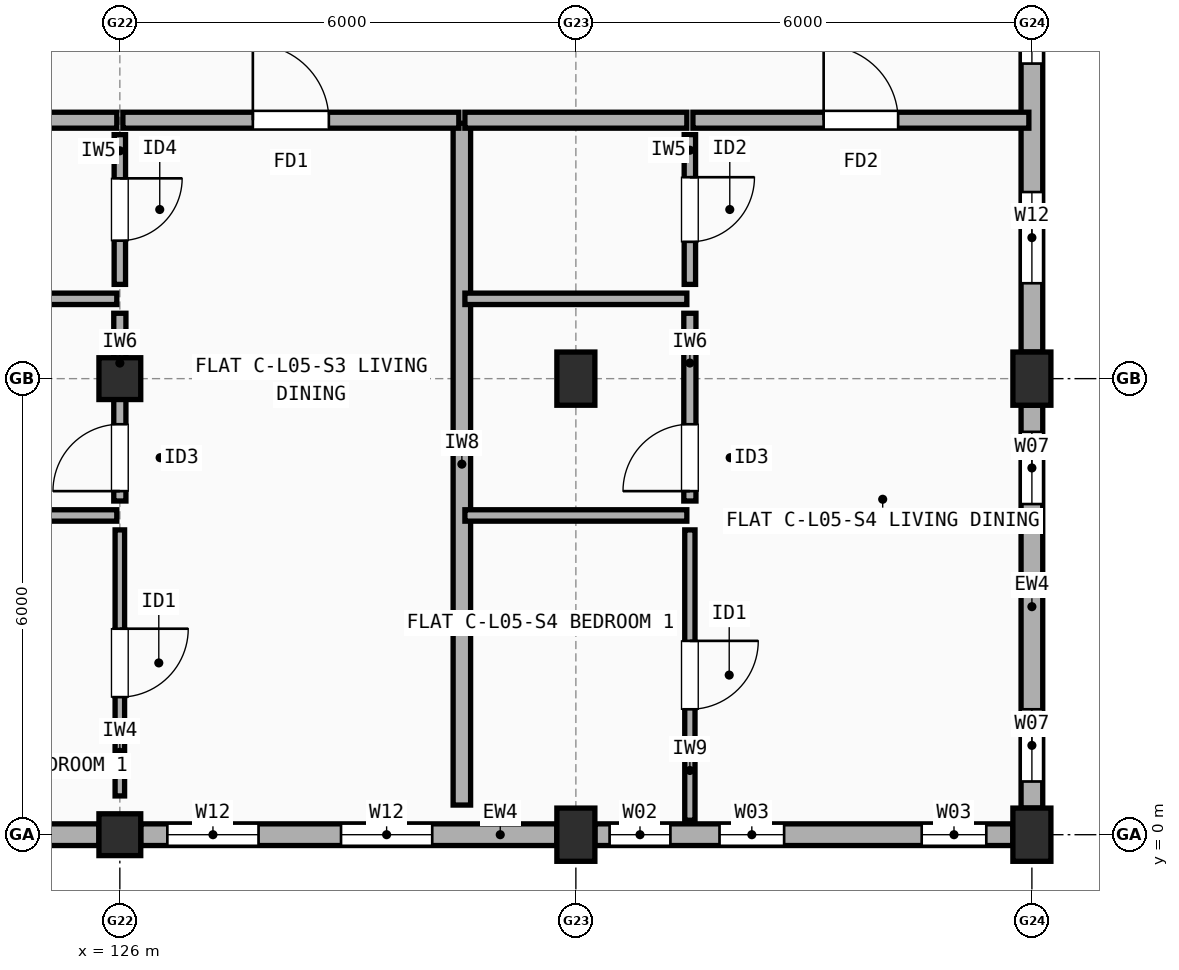
"""IFC4 building model, lengths in metres.
Left out: names, types, materials, properties, quantities, classifications, styles, units other than length and angle.
Written with IfcOpenShell. Run it as: python <this file> out.ifc"""

import sys

from ifc_helpers import new_model, si_unit, direction, frame, frame_2d, origin, origin_2d, place, context, subcontext, project, spatial, rectangle, extrude, element, fill, save


model = new_model("IFC4")
c1 = context("Model", 3, precision=1e-05, world=origin(), true_north=direction((0.0, 1.0)))
c2 = subcontext(c1, "Body", "Model", "MODEL_VIEW")
j1 = project(units=[si_unit("LENGTHUNIT", "METRE"), si_unit("PLANEANGLEUNIT", "RADIAN")], contexts=[c1])
p1 = place(None, origin())
s1 = spatial("IfcSite", under=j1, at=p1, CompositionType="ELEMENT")
p2 = place(p1, origin())
s2 = spatial("IfcBuilding", under=s1, at=p2, CompositionType="ELEMENT")
p3 = place(p2, frame((0.0, 0.0, 17.3)))
s3 = spatial("IfcBuildingStorey", under=s2, at=p3, CompositionType="ELEMENT", Elevation=17.3)
for number, where, z_axis, x_axis in (
    (1, (126.0, 0.0, 0.0), (0.0, 0.0, 1.0), (1.0, 0.0, 0.0)),
    (2, (126.0, 6.0, 0.0), (0.0, 0.0, 1.0), (1.0, 0.0, 0.0)),
):
    element("IfcColumn", number, at=place(p3, frame(where, z_axis=z_axis, x_axis=x_axis)), inside=s3, PredefinedType="COLUMN", context=c2, shape_type="SweptSolid", body=[
        extrude(rectangle(XDim=0.55, YDim=0.55, at=origin_2d()), origin(), (0.0, 0.0, 1.0), 2.965),
    ])
for number, where, z_axis, x_axis in (
    (3, (132.0, 0.0, 0.0), (0.0, 0.0, 1.0), (1.0, 0.0, 0.0)),
    (4, (132.0, 6.0, 0.0), (0.0, 0.0, 1.0), (1.0, 0.0, 0.0)),
    (5, (138.0, 0.0, 0.0), (0.0, 0.0, 1.0), (1.0, 0.0, 0.0)),
    (6, (138.0, 6.0, 0.0), (0.0, 0.0, 1.0), (1.0, 0.0, 0.0)),
):
    element("IfcColumn", number, at=place(p3, frame(where, z_axis=z_axis, x_axis=x_axis)), inside=s3, PredefinedType="COLUMN", context=c2, shape_type="SweptSolid", body=[
        extrude(rectangle(XDim=0.5, YDim=0.7, at=origin_2d()), origin(), (0.0, 0.0, 1.0), 2.965),
    ])
p4 = place(p3, frame((120.275, 0.0, 0.0), z_axis=(0.0, 0.0, 1.0), x_axis=(1.0, 0.0, 0.0)))
e7 = element("IfcWall", 7, at=p4, inside=s3, PredefinedType="STANDARD", context=c2, shape_type="SweptSolid", body=[
    extrude(rectangle(XDim=5.45, YDim=0.285, at=frame_2d((2.725, 0.0))), origin(), (0.0, 0.0, 1.0), 2.447),
])
p5 = place(p4, frame((0.867, 0.0, 0.9)))
e8 = element("IfcOpeningElement", 8, at=p5, cuts=e7, PredefinedType="OPENING", context=c2, shape_type="SweptSolid", body=[
    extrude(rectangle(XDim=0.95, YDim=1.35, at=frame_2d((0.475, 0.675))), frame((0.0, 0.152, 0.0), z_axis=(0.0, -1.0, 0.0), x_axis=(1.0, 0.0, 0.0)), (0.0, 0.0, 1.0), 0.305),
])
p6 = place(p4, frame((3.583, 0.0, 0.9)))
e9 = element("IfcOpeningElement", 9, at=p6, cuts=e7, PredefinedType="OPENING", context=c2, shape_type="SweptSolid", body=[
    extrude(rectangle(XDim=1.05, YDim=1.35, at=frame_2d((0.525, 0.675))), frame((0.0, 0.152, 0.0), z_axis=(0.0, -1.0, 0.0), x_axis=(1.0, 0.0, 0.0)), (0.0, 0.0, 1.0), 0.305),
])
p7 = place(p3, frame((126.275, 0.0, 0.0), z_axis=(0.0, 0.0, 1.0), x_axis=(1.0, 0.0, 0.0)))
e10 = element("IfcWall", 10, at=p7, inside=s3, PredefinedType="STANDARD", context=c2, shape_type="SweptSolid", body=[
    extrude(rectangle(XDim=5.475, YDim=0.285, at=frame_2d((2.738, 0.0))), origin(), (0.0, 0.0, 1.0), 2.447),
])
p8 = place(p7, frame((0.35, 0.0, 0.9)))
e11 = element("IfcOpeningElement", 11, at=p8, cuts=e10, PredefinedType="OPENING", context=c2, shape_type="SweptSolid", body=[
    extrude(rectangle(XDim=1.2, YDim=1.35, at=frame_2d((0.6, 0.675))), frame((0.0, 0.152, 0.0), z_axis=(0.0, -1.0, 0.0), x_axis=(1.0, 0.0, 0.0)), (0.0, 0.0, 1.0), 0.305),
])
p9 = place(p7, frame((2.635, 0.0, 0.9)))
e12 = element("IfcOpeningElement", 12, at=p9, cuts=e10, PredefinedType="OPENING", context=c2, shape_type="SweptSolid", body=[
    extrude(rectangle(XDim=1.2, YDim=1.35, at=frame_2d((0.6, 0.675))), frame((0.0, 0.152, 0.0), z_axis=(0.0, -1.0, 0.0), x_axis=(1.0, 0.0, 0.0)), (0.0, 0.0, 1.0), 0.305),
])
p10 = place(p3, frame((132.25, 0.0, 0.0), z_axis=(0.0, 0.0, 1.0), x_axis=(1.0, 0.0, 0.0)))
e13 = element("IfcWall", 13, at=p10, inside=s3, PredefinedType="STANDARD", context=c2, shape_type="SweptSolid", body=[
    extrude(rectangle(XDim=5.5, YDim=0.285, at=frame_2d((2.75, 0.0))), origin(), (0.0, 0.0, 1.0), 2.447),
])
p11 = place(p10, frame((1.64, 0.0, 0.9)))
e14 = element("IfcOpeningElement", 14, at=p11, cuts=e13, PredefinedType="OPENING", context=c2, shape_type="SweptSolid", body=[
    extrude(rectangle(XDim=0.85, YDim=1.25, at=frame_2d((0.425, 0.625))), frame((0.0, 0.152, 0.0), z_axis=(0.0, -1.0, 0.0), x_axis=(1.0, 0.0, 0.0)), (0.0, 0.0, 1.0), 0.305),
])
p12 = place(p10, frame((4.3, 0.0, 0.9)))
e15 = element("IfcOpeningElement", 15, at=p12, cuts=e13, PredefinedType="OPENING", context=c2, shape_type="SweptSolid", body=[
    extrude(rectangle(XDim=0.85, YDim=1.25, at=frame_2d((0.425, 0.625))), frame((0.0, 0.152, 0.0), z_axis=(0.0, -1.0, 0.0), x_axis=(1.0, 0.0, 0.0)), (0.0, 0.0, 1.0), 0.305),
])
p13 = place(p10, frame((0.194, 0.0, 0.9)))
e16 = element("IfcOpeningElement", 16, at=p13, cuts=e13, PredefinedType="OPENING", context=c2, shape_type="SweptSolid", body=[
    extrude(rectangle(XDim=0.8, YDim=1.2, at=frame_2d((0.4, 0.6))), frame((0.0, 0.152, 0.0), z_axis=(0.0, -1.0, 0.0), x_axis=(1.0, 0.0, 0.0)), (0.0, 0.0, 1.0), 0.305),
])
p14 = place(p3, frame((138.0, 0.35, 0.0), z_axis=(0.0, 0.0, 1.0), x_axis=(0.0, 1.0, 0.0)))
e17 = element("IfcWall", 17, at=p14, inside=s3, PredefinedType="STANDARD", context=c2, shape_type="SweptSolid", body=[
    extrude(rectangle(XDim=5.3, YDim=0.285, at=frame_2d((2.65, 0.0))), origin(), (0.0, 0.0, 1.0), 2.447),
])
p15 = place(p14, frame((0.35, 0.0, 0.9)))
e18 = element("IfcOpeningElement", 18, at=p15, cuts=e17, PredefinedType="OPENING", context=c2, shape_type="SweptSolid", body=[
    extrude(rectangle(XDim=0.95, YDim=1.35, at=frame_2d((0.475, 0.675))), frame((0.0, 0.152, 0.0), z_axis=(0.0, -1.0, 0.0), x_axis=(1.0, 0.0, 0.0)), (0.0, 0.0, 1.0), 0.305),
])
p16 = place(p14, frame((4.0, 0.0, 0.9)))
e19 = element("IfcOpeningElement", 19, at=p16, cuts=e17, PredefinedType="OPENING", context=c2, shape_type="SweptSolid", body=[
    extrude(rectangle(XDim=0.95, YDim=1.35, at=frame_2d((0.475, 0.675))), frame((0.0, 0.152, 0.0), z_axis=(0.0, -1.0, 0.0), x_axis=(1.0, 0.0, 0.0)), (0.0, 0.0, 1.0), 0.305),
])
p17 = place(p3, frame((138.0, 6.35, 0.0), z_axis=(0.0, 0.0, 1.0), x_axis=(0.0, 1.0, 0.0)))
e20 = element("IfcWall", 20, at=p17, inside=s3, PredefinedType="STANDARD", context=c2, shape_type="SweptSolid", body=[
    extrude(rectangle(XDim=5.3, YDim=0.285, at=frame_2d((2.65, 0.0))), origin(), (0.0, 0.0, 1.0), 2.447),
])
p18 = place(p17, frame((0.905, 0.0, 0.9)))
e21 = element("IfcOpeningElement", 21, at=p18, cuts=e20, PredefinedType="OPENING", context=c2, shape_type="SweptSolid", body=[
    extrude(rectangle(XDim=1.2, YDim=1.35, at=frame_2d((0.6, 0.675))), frame((0.0, 0.152, 0.0), z_axis=(0.0, -1.0, 0.0), x_axis=(1.0, 0.0, 0.0)), (0.0, 0.0, 1.0), 0.305),
])
p19 = place(p17, frame((3.795, 0.0, 0.9)))
e22 = element("IfcOpeningElement", 22, at=p19, cuts=e20, PredefinedType="OPENING", context=c2, shape_type="SweptSolid", body=[
    extrude(rectangle(XDim=0.8, YDim=1.2, at=frame_2d((0.4, 0.6))), frame((0.0, 0.152, 0.0), z_axis=(0.0, -1.0, 0.0), x_axis=(1.0, 0.0, 0.0)), (0.0, 0.0, 1.0), 0.305),
])
p20 = place(p3, frame((130.5, 0.39, 0.0), z_axis=(0.0, 0.0, 1.0), x_axis=(0.0, 1.0, 0.0)))
e23 = element("IfcWall", 23, at=p20, inside=s3, PredefinedType="SOLIDWALL", context=c2, shape_type="SweptSolid", body=[
    extrude(rectangle(XDim=8.97, YDim=0.23, at=frame_2d((4.485, 0.0))), origin(), (0.0, 0.0, 1.0), 2.447),
])
p21 = place(p3, frame((123.04, 9.4, 0.0), z_axis=(0.0, 0.0, 1.0), x_axis=(1.0, 0.0, 0.0)))
e24 = element("IfcWall", 24, at=p21, inside=s3, PredefinedType="SOLIDWALL", context=c2, shape_type="SweptSolid", body=[
    extrude(rectangle(XDim=2.92, YDim=0.21, at=frame_2d((1.46, 0.0))), origin(), (0.0, 0.0, 1.0), 2.548),
])
p22 = place(p3, frame((126.04, 9.4, 0.0), z_axis=(0.0, 0.0, 1.0), x_axis=(1.0, 0.0, 0.0)))
e25 = element("IfcWall", 25, at=p22, inside=s3, PredefinedType="SOLIDWALL", context=c2, shape_type="SweptSolid", body=[
    extrude(rectangle(XDim=4.42, YDim=0.21, at=frame_2d((2.21, 0.0))), origin(), (0.0, 0.0, 1.0), 2.548),
])
p23 = place(p22, frame((1.71, 0.0, 0.0)))
e26 = element("IfcOpeningElement", 26, at=p23, cuts=e25, PredefinedType="OPENING", context=c2, shape_type="SweptSolid", body=[
    extrude(rectangle(XDim=1.0, YDim=2.15, at=frame_2d((0.5, 1.075))), frame((0.0, 0.115, 0.0), z_axis=(0.0, -1.0, 0.0), x_axis=(1.0, 0.0, 0.0)), (0.0, 0.0, 1.0), 0.23),
])
p24 = place(p3, frame((126.0, 0.51, 0.0), z_axis=(0.0, 0.0, 1.0), x_axis=(0.0, 1.0, 0.0)))
e27 = element("IfcWall", 27, at=p24, inside=s3, PredefinedType="PARTITIONING", context=c2, shape_type="SweptSolid", body=[
    extrude(rectangle(XDim=3.5, YDim=0.125, at=frame_2d((1.75, 0.0))), origin(), (0.0, 0.0, 1.0), 2.458),
])
p25 = place(p24, frame((1.3, 0.0, 0.0)))
e28 = element("IfcOpeningElement", 28, at=p25, cuts=e27, PredefinedType="OPENING", context=c2, shape_type="SweptSolid", body=[
    extrude(rectangle(XDim=0.9, YDim=2.1, at=frame_2d((0.45, 1.05))), frame((0.0, 0.073, 0.0), z_axis=(0.0, -1.0, 0.0), x_axis=(1.0, 0.0, 0.0)), (0.0, 0.0, 1.0), 0.145),
])
p26 = place(p3, frame((126.0, 4.39, 0.0), z_axis=(0.0, 0.0, 1.0), x_axis=(0.0, 1.0, 0.0)))
e29 = element("IfcWall", 29, at=p26, inside=s3, PredefinedType="PLUMBINGWALL", context=c2, shape_type="SweptSolid", body=[
    extrude(rectangle(XDim=2.47, YDim=0.16, at=frame_2d((1.235, 0.0))), origin(), (0.0, 0.0, 1.0), 2.458),
])
p27 = place(p26, frame((0.13, 0.0, 0.0)))
e30 = element("IfcOpeningElement", 30, at=p27, cuts=e29, PredefinedType="OPENING", context=c2, shape_type="SweptSolid", body=[
    extrude(rectangle(XDim=0.88, YDim=2.1, at=frame_2d((0.44, 1.05))), frame((0.0, 0.09, 0.0), z_axis=(0.0, -1.0, 0.0), x_axis=(1.0, 0.0, 0.0)), (0.0, 0.0, 1.0), 0.18),
])
p28 = place(p3, frame((126.0, 7.24, 0.0), z_axis=(0.0, 0.0, 1.0), x_axis=(0.0, 1.0, 0.0)))
e31 = element("IfcWall", 31, at=p28, inside=s3, PredefinedType="PARTITIONING", context=c2, shape_type="SweptSolid", body=[
    extrude(rectangle(XDim=1.97, YDim=0.15, at=frame_2d((0.985, 0.0))), origin(), (0.0, 0.0, 1.0), 2.548),
])
p29 = place(p28, frame((0.575, 0.0, 0.0)))
e32 = element("IfcOpeningElement", 32, at=p29, cuts=e31, PredefinedType="OPENING", context=c2, shape_type="SweptSolid", body=[
    extrude(rectangle(XDim=0.82, YDim=2.08, at=frame_2d((0.41, 1.04))), frame((0.0, 0.085, 0.0), z_axis=(0.0, -1.0, 0.0), x_axis=(1.0, 0.0, 0.0)), (0.0, 0.0, 1.0), 0.17),
])
p30 = place(p3, frame((123.04, 4.2, 0.0), z_axis=(0.0, 0.0, 1.0), x_axis=(1.0, 0.0, 0.0)))
e33 = element("IfcWall", 33, at=p30, inside=s3, PredefinedType="PARTITIONING", context=c2, shape_type="SweptSolid", body=[
    extrude(rectangle(XDim=2.92, YDim=0.15, at=frame_2d((1.46, 0.0))), origin(), (0.0, 0.0, 1.0), 2.458),
])
p31 = place(p3, frame((123.04, 7.05, 0.0), z_axis=(0.0, 0.0, 1.0), x_axis=(1.0, 0.0, 0.0)))
e34 = element("IfcWall", 34, at=p31, inside=s3, PredefinedType="PARTITIONING", context=c2, shape_type="SweptSolid", body=[
    extrude(rectangle(XDim=2.92, YDim=0.15, at=frame_2d((1.46, 0.0))), origin(), (0.0, 0.0, 1.0), 2.548),
])
p32 = place(p3, frame((130.54, 9.4, 0.0), z_axis=(0.0, 0.0, 1.0), x_axis=(1.0, 0.0, 0.0)))
e35 = element("IfcWall", 35, at=p32, inside=s3, PredefinedType="SOLIDWALL", context=c2, shape_type="SweptSolid", body=[
    extrude(rectangle(XDim=2.92, YDim=0.21, at=frame_2d((1.46, 0.0))), origin(), (0.0, 0.0, 1.0), 2.447),
])
p33 = place(p3, frame((133.54, 9.4, 0.0), z_axis=(0.0, 0.0, 1.0), x_axis=(1.0, 0.0, 0.0)))
e36 = element("IfcWall", 36, at=p33, inside=s3, PredefinedType="SOLIDWALL", context=c2, shape_type="SweptSolid", body=[
    extrude(rectangle(XDim=4.42, YDim=0.21, at=frame_2d((2.21, 0.0))), origin(), (0.0, 0.0, 1.0), 2.447),
])
p34 = place(p33, frame((1.72, 0.0, 0.0)))
e37 = element("IfcOpeningElement", 37, at=p34, cuts=e36, PredefinedType="OPENING", context=c2, shape_type="SweptSolid", body=[
    extrude(rectangle(XDim=0.98, YDim=2.15, at=frame_2d((0.49, 1.075))), frame((0.0, 0.115, 0.0), z_axis=(0.0, -1.0, 0.0), x_axis=(1.0, 0.0, 0.0)), (0.0, 0.0, 1.0), 0.23),
])
p35 = place(p3, frame((133.5, 0.19, 0.0), z_axis=(0.0, 0.0, 1.0), x_axis=(0.0, 1.0, 0.0)))
e38 = element("IfcWall", 38, at=p35, inside=s3, PredefinedType="PARTITIONING", context=c2, shape_type="SweptSolid", body=[
    extrude(rectangle(XDim=3.82, YDim=0.135, at=frame_2d((1.91, 0.0))), origin(), (0.0, 0.0, 1.0), 2.965),
])
p36 = place(p35, frame((1.46, 0.0, 0.0)))
e39 = element("IfcOpeningElement", 39, at=p36, cuts=e38, PredefinedType="OPENING", context=c2, shape_type="SweptSolid", body=[
    extrude(rectangle(XDim=0.9, YDim=2.1, at=frame_2d((0.45, 1.05))), frame((0.0, 0.077, 0.0), z_axis=(0.0, -1.0, 0.0), x_axis=(1.0, 0.0, 0.0)), (0.0, 0.0, 1.0), 0.155),
])
p37 = place(p3, frame((133.5, 4.39, 0.0), z_axis=(0.0, 0.0, 1.0), x_axis=(0.0, 1.0, 0.0)))
e40 = element("IfcWall", 40, at=p37, inside=s3, PredefinedType="PLUMBINGWALL", context=c2, shape_type="SweptSolid", body=[
    extrude(rectangle(XDim=2.47, YDim=0.16, at=frame_2d((1.235, 0.0))), origin(), (0.0, 0.0, 1.0), 2.447),
])
p38 = place(p37, frame((0.13, 0.0, 0.0)))
e41 = element("IfcOpeningElement", 41, at=p38, cuts=e40, PredefinedType="OPENING", context=c2, shape_type="SweptSolid", body=[
    extrude(rectangle(XDim=0.88, YDim=2.1, at=frame_2d((0.44, 1.05))), frame((0.0, 0.09, 0.0), z_axis=(0.0, -1.0, 0.0), x_axis=(1.0, 0.0, 0.0)), (0.0, 0.0, 1.0), 0.18),
])
p39 = place(p3, frame((133.5, 7.24, 0.0), z_axis=(0.0, 0.0, 1.0), x_axis=(0.0, 1.0, 0.0)))
e42 = element("IfcWall", 42, at=p39, inside=s3, PredefinedType="PARTITIONING", context=c2, shape_type="SweptSolid", body=[
    extrude(rectangle(XDim=1.97, YDim=0.15, at=frame_2d((0.985, 0.0))), origin(), (0.0, 0.0, 1.0), 2.965),
])
p40 = place(p39, frame((0.56, 0.0, 0.0)))
e43 = element("IfcOpeningElement", 43, at=p40, cuts=e42, PredefinedType="OPENING", context=c2, shape_type="SweptSolid", body=[
    extrude(rectangle(XDim=0.85, YDim=2.1, at=frame_2d((0.425, 1.05))), frame((0.0, 0.085, 0.0), z_axis=(0.0, -1.0, 0.0), x_axis=(1.0, 0.0, 0.0)), (0.0, 0.0, 1.0), 0.17),
])
for number, where, z_axis, x_axis in (
    (44, (130.54, 4.2, 0.0), (0.0, 0.0, 1.0), (1.0, 0.0, 0.0)),
    (45, (130.54, 7.05, 0.0), (0.0, 0.0, 1.0), (1.0, 0.0, 0.0)),
):
    element("IfcWall", number, at=place(p3, frame(where, z_axis=z_axis, x_axis=x_axis)), inside=s3, PredefinedType="PARTITIONING", context=c2, shape_type="SweptSolid", body=[
        extrude(rectangle(XDim=2.92, YDim=0.15, at=frame_2d((1.46, 0.0))), origin(), (0.0, 0.0, 1.0), 2.447),
    ])
p41 = place(p8, origin())
e46 = element("IfcWindow", 46, at=p41, inside=s3, PartitioningType="SINGLE_PANEL", PredefinedType="WINDOW", context=c2, shape_type="SweptSolid", body=[
    extrude(rectangle(XDim=1.2, YDim=1.35, at=frame_2d((0.6, 0.675))), frame((0.0, 0.03, 0.0), z_axis=(0.0, -1.0, 0.0), x_axis=(1.0, 0.0, 0.0)), (0.0, 0.0, 1.0), 0.06),
])
fill(e11, e46)
p42 = place(p9, origin())
e47 = element("IfcWindow", 47, at=p42, inside=s3, PartitioningType="SINGLE_PANEL", PredefinedType="WINDOW", context=c2, shape_type="SweptSolid", body=[
    extrude(rectangle(XDim=1.2, YDim=1.35, at=frame_2d((0.6, 0.675))), frame((0.0, 0.03, 0.0), z_axis=(0.0, -1.0, 0.0), x_axis=(1.0, 0.0, 0.0)), (0.0, 0.0, 1.0), 0.06),
])
fill(e12, e47)
p43 = place(p11, origin())
e48 = element("IfcWindow", 48, at=p43, inside=s3, PartitioningType="SINGLE_PANEL", PredefinedType="WINDOW", context=c2, shape_type="SweptSolid", body=[
    extrude(rectangle(XDim=0.85, YDim=1.25, at=frame_2d((0.425, 0.625))), frame((0.0, 0.03, 0.0), z_axis=(0.0, -1.0, 0.0), x_axis=(1.0, 0.0, 0.0)), (0.0, 0.0, 1.0), 0.06),
])
fill(e14, e48)
p44 = place(p12, origin())
e49 = element("IfcWindow", 49, at=p44, inside=s3, PartitioningType="SINGLE_PANEL", PredefinedType="WINDOW", context=c2, shape_type="SweptSolid", body=[
    extrude(rectangle(XDim=0.85, YDim=1.25, at=frame_2d((0.425, 0.625))), frame((0.0, 0.03, 0.0), z_axis=(0.0, -1.0, 0.0), x_axis=(1.0, 0.0, 0.0)), (0.0, 0.0, 1.0), 0.06),
])
fill(e15, e49)
p45 = place(p15, origin())
e50 = element("IfcWindow", 50, at=p45, inside=s3, PartitioningType="SINGLE_PANEL", PredefinedType="WINDOW", context=c2, shape_type="SweptSolid", body=[
    extrude(rectangle(XDim=0.95, YDim=1.35, at=frame_2d((0.475, 0.675))), frame((0.0, 0.03, 0.0), z_axis=(0.0, -1.0, 0.0), x_axis=(1.0, 0.0, 0.0)), (0.0, 0.0, 1.0), 0.06),
])
fill(e18, e50)
p46 = place(p16, origin())
e51 = element("IfcWindow", 51, at=p46, inside=s3, PartitioningType="SINGLE_PANEL", PredefinedType="WINDOW", context=c2, shape_type="SweptSolid", body=[
    extrude(rectangle(XDim=0.95, YDim=1.35, at=frame_2d((0.475, 0.675))), frame((0.0, 0.03, 0.0), z_axis=(0.0, -1.0, 0.0), x_axis=(1.0, 0.0, 0.0)), (0.0, 0.0, 1.0), 0.06),
])
fill(e19, e51)
p47 = place(p18, origin())
e52 = element("IfcWindow", 52, at=p47, inside=s3, PartitioningType="SINGLE_PANEL", PredefinedType="WINDOW", context=c2, shape_type="SweptSolid", body=[
    extrude(rectangle(XDim=1.2, YDim=1.35, at=frame_2d((0.6, 0.675))), frame((0.0, 0.03, 0.0), z_axis=(0.0, -1.0, 0.0), x_axis=(1.0, 0.0, 0.0)), (0.0, 0.0, 1.0), 0.06),
])
fill(e21, e52)
p48 = place(p19, origin())
e53 = element("IfcWindow", 53, at=p48, inside=s3, PartitioningType="SINGLE_PANEL", PredefinedType="WINDOW", context=c2, shape_type="SweptSolid", body=[
    extrude(rectangle(XDim=0.8, YDim=1.2, at=frame_2d((0.4, 0.6))), frame((0.0, 0.03, 0.0), z_axis=(0.0, -1.0, 0.0), x_axis=(1.0, 0.0, 0.0)), (0.0, 0.0, 1.0), 0.06),
])
fill(e22, e53)
p49 = place(p13, origin())
e54 = element("IfcWindow", 54, at=p49, inside=s3, PartitioningType="SINGLE_PANEL", PredefinedType="WINDOW", context=c2, shape_type="SweptSolid", body=[
    extrude(rectangle(XDim=0.8, YDim=1.2, at=frame_2d((0.4, 0.6))), frame((0.0, 0.03, 0.0), z_axis=(0.0, -1.0, 0.0), x_axis=(1.0, 0.0, 0.0)), (0.0, 0.0, 1.0), 0.06),
])
fill(e16, e54)
p50 = place(p23, origin())
e55 = element("IfcDoor", 55, at=p50, inside=s3, OperationType="SINGLE_SWING_LEFT", PredefinedType="DOOR", context=c2, shape_type="SweptSolid", body=[
    extrude(rectangle(XDim=1.0, YDim=2.15, at=frame_2d((0.5, 1.075))), frame((0.0, 0.025, 0.0), z_axis=(0.0, -1.0, 0.0), x_axis=(1.0, 0.0, 0.0)), (0.0, 0.0, 1.0), 0.05),
])
fill(e26, e55)
p51 = place(p25, origin())
e56 = element("IfcDoor", 56, at=p51, inside=s3, OperationType="SINGLE_SWING_RIGHT", PredefinedType="DOOR", context=c2, shape_type="SweptSolid", body=[
    extrude(rectangle(XDim=0.9, YDim=2.1, at=frame_2d((0.45, 1.05))), frame((0.0, 0.025, 0.0), z_axis=(0.0, -1.0, 0.0), x_axis=(1.0, 0.0, 0.0)), (0.0, 0.0, 1.0), 0.05),
])
fill(e28, e56)
p52 = place(p27, origin())
e57 = element("IfcDoor", 57, at=p52, inside=s3, OperationType="SINGLE_SWING_LEFT", PredefinedType="DOOR", context=c2, shape_type="SweptSolid", body=[
    extrude(rectangle(XDim=0.88, YDim=2.1, at=frame_2d((0.44, 1.05))), frame((0.0, 0.025, 0.0), z_axis=(0.0, -1.0, 0.0), x_axis=(1.0, 0.0, 0.0)), (0.0, 0.0, 1.0), 0.05),
])
fill(e30, e57)
p53 = place(p29, origin())
e58 = element("IfcDoor", 58, at=p53, inside=s3, OperationType="SINGLE_SWING_RIGHT", PredefinedType="DOOR", context=c2, shape_type="SweptSolid", body=[
    extrude(rectangle(XDim=0.82, YDim=2.08, at=frame_2d((0.41, 1.04))), frame((0.0, 0.025, 0.0), z_axis=(0.0, -1.0, 0.0), x_axis=(1.0, 0.0, 0.0)), (0.0, 0.0, 1.0), 0.05),
])
fill(e32, e58)
p54 = place(p34, origin())
e59 = element("IfcDoor", 59, at=p54, inside=s3, OperationType="SINGLE_SWING_LEFT", PredefinedType="DOOR", context=c2, shape_type="SweptSolid", body=[
    extrude(rectangle(XDim=0.98, YDim=2.15, at=frame_2d((0.49, 1.075))), frame((0.0, 0.025, 0.0), z_axis=(0.0, -1.0, 0.0), x_axis=(1.0, 0.0, 0.0)), (0.0, 0.0, 1.0), 0.05),
])
fill(e37, e59)
p55 = place(p36, origin())
e60 = element("IfcDoor", 60, at=p55, inside=s3, OperationType="SINGLE_SWING_RIGHT", PredefinedType="DOOR", context=c2, shape_type="SweptSolid", body=[
    extrude(rectangle(XDim=0.9, YDim=2.1, at=frame_2d((0.45, 1.05))), frame((0.0, 0.025, 0.0), z_axis=(0.0, -1.0, 0.0), x_axis=(1.0, 0.0, 0.0)), (0.0, 0.0, 1.0), 0.05),
])
fill(e39, e60)
p56 = place(p38, origin())
e61 = element("IfcDoor", 61, at=p56, inside=s3, OperationType="SINGLE_SWING_LEFT", PredefinedType="DOOR", context=c2, shape_type="SweptSolid", body=[
    extrude(rectangle(XDim=0.88, YDim=2.1, at=frame_2d((0.44, 1.05))), frame((0.0, 0.025, 0.0), z_axis=(0.0, -1.0, 0.0), x_axis=(1.0, 0.0, 0.0)), (0.0, 0.0, 1.0), 0.05),
])
fill(e41, e61)
p57 = place(p40, origin())
e62 = element("IfcDoor", 62, at=p57, inside=s3, OperationType="SINGLE_SWING_RIGHT", PredefinedType="DOOR", context=c2, shape_type="SweptSolid", body=[
    extrude(rectangle(XDim=0.85, YDim=2.1, at=frame_2d((0.425, 1.05))), frame((0.0, 0.025, 0.0), z_axis=(0.0, -1.0, 0.0), x_axis=(1.0, 0.0, 0.0)), (0.0, 0.0, 1.0), 0.05),
])
fill(e43, e62)
save(model, sys.argv[1])
